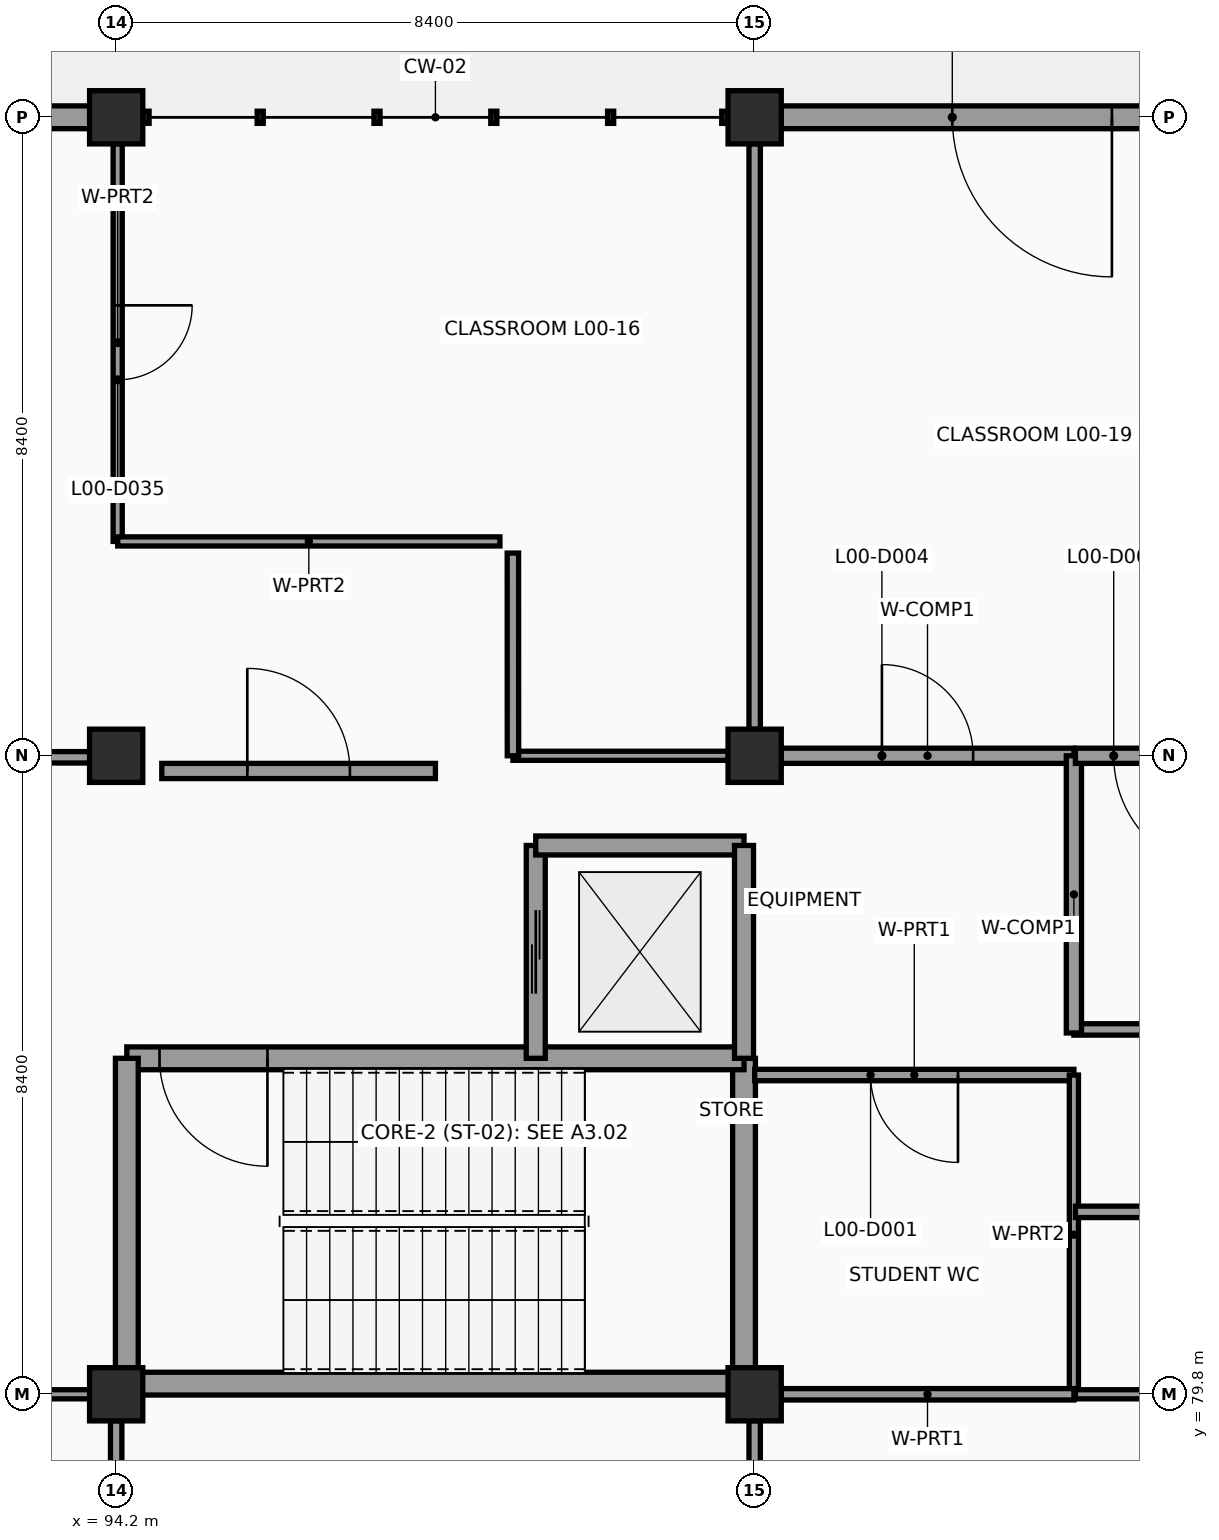
"""IFC4 building model, lengths in metres.
Left out: names, types, materials, properties, quantities, classifications, styles, units other than length and angle.
Written with IfcOpenShell. Run it as: python <this file> out.ifc"""

import sys

from ifc_helpers import new_model, si_unit, direction, frame, frame_2d, origin, origin_2d, place, context, subcontext, project, spatial, rectangle, extrude, element, fill, save


model = new_model("IFC4")
c1 = context("Model", 3, precision=1e-05, world=origin(), true_north=direction((0.0, 1.0)))
c2 = subcontext(c1, "Body", "Model", "MODEL_VIEW")
j1 = project(units=[si_unit("LENGTHUNIT", "METRE"), si_unit("PLANEANGLEUNIT", "RADIAN")], contexts=[c1])
p1 = place(None, origin())
s1 = spatial("IfcSite", under=j1, at=p1, CompositionType="ELEMENT")
p2 = place(p1, origin())
s2 = spatial("IfcBuilding", under=s1, at=p2, CompositionType="ELEMENT")
p3 = place(p2, origin())
s3 = spatial("IfcBuildingStorey", under=s2, at=p3, CompositionType="ELEMENT", Elevation=0.0)
for number, where, z_axis, x_axis in (
    (1, (94.2, 79.8, -0.4), (0.0, 0.0, 1.0), (1.0, 0.0, 0.0)),
    (2, (94.2, 88.2, -0.4), (0.0, 0.0, 1.0), (1.0, 0.0, 0.0)),
    (3, (94.2, 96.6, -0.4), (0.0, 0.0, 1.0), (1.0, 0.0, 0.0)),
    (4, (102.6, 79.8, -0.4), (0.0, 0.0, 1.0), (1.0, 0.0, 0.0)),
    (5, (102.6, 88.2, -0.4), (0.0, 0.0, 1.0), (1.0, 0.0, 0.0)),
    (6, (102.6, 96.6, -0.4), (0.0, 0.0, 1.0), (1.0, 0.0, 0.0)),
):
    element("IfcColumn", number, at=place(p3, frame(where, z_axis=z_axis, x_axis=x_axis)), inside=s3, PredefinedType="COLUMN", context=c2, shape_type="SweptSolid", body=[
        extrude(rectangle(XDim=0.7, YDim=0.7, at=origin_2d()), origin(), (0.0, 0.0, 1.0), 4.6),
    ])
p4 = place(p3, frame((86.148, 96.6, 0.0), z_axis=(0.0, 0.0, 1.0), x_axis=(1.0, 0.0, 0.0)))
e7 = element("IfcWall", 7, at=p4, inside=s3, PredefinedType="SOLIDWALL", context=c2, shape_type="SweptSolid", body=[
    extrude(rectangle(XDim=7.704, YDim=0.3, at=frame_2d((3.852, 0.0))), origin(), (0.0, 0.0, 1.0), 3.22),
])
p5 = place(p4, frame((2.352, 0.0, 0.0)))
e8 = element("IfcOpeningElement", 8, at=p5, cuts=e7, PredefinedType="OPENING", context=c2, shape_type="SweptSolid", body=[
    extrude(rectangle(XDim=3.0, YDim=2.5, at=frame_2d((1.5, 1.25))), frame((0.0, 0.16, 0.0), z_axis=(0.0, -1.0, 0.0), x_axis=(1.0, 0.0, 0.0)), (0.0, 0.0, 1.0), 0.32),
])
p6 = place(p3, frame((102.948, 96.6, 0.0), z_axis=(0.0, 0.0, 1.0), x_axis=(1.0, 0.0, 0.0)))
e9 = element("IfcWall", 9, at=p6, inside=s3, PredefinedType="SOLIDWALL", context=c2, shape_type="SweptSolid", body=[
    extrude(rectangle(XDim=6.604, YDim=0.3, at=frame_2d((3.302, 0.0))), origin(), (0.0, 0.0, 1.0), 3.22),
])
p7 = place(p6, frame((2.252, 0.0, 0.0)))
e10 = element("IfcOpeningElement", 10, at=p7, cuts=e9, PredefinedType="OPENING", context=c2, shape_type="SweptSolid", body=[
    extrude(rectangle(XDim=2.1, YDim=2.3, at=frame_2d((1.05, 1.15))), frame((0.0, 0.16, 0.0), z_axis=(0.0, -1.0, 0.0), x_axis=(1.0, 0.0, 0.0)), (0.0, 0.0, 1.0), 0.32),
])
p8 = place(p3, frame((94.34, 79.94, -0.4), z_axis=(0.0, 0.0, 1.0), x_axis=(1.0, 0.0, 0.0)))
e11 = element("IfcWall", 11, at=p8, inside=s3, PredefinedType="SHEAR", context=c2, shape_type="SweptSolid", body=[
    extrude(rectangle(XDim=8.12, YDim=0.3, at=frame_2d((4.06, 0.0))), origin(), (0.0, 0.0, 1.0), 4.6),
])
p9 = place(p3, frame((102.46, 79.94, -0.4), z_axis=(0.0, 0.0, 1.0), x_axis=(0.0, 1.0, 0.0)))
e12 = element("IfcWall", 12, at=p9, inside=s3, PredefinedType="SHEAR", context=c2, shape_type="SweptSolid", body=[
    extrude(rectangle(XDim=4.28, YDim=0.3, at=frame_2d((2.14, 0.0))), origin(), (0.0, 0.0, 1.0), 4.6),
])
p10 = place(p3, frame((102.46, 84.22, -0.4), z_axis=(0.0, 0.0, 1.0), x_axis=(-1.0, 0.0, 0.0)))
e13 = element("IfcWall", 13, at=p10, inside=s3, PredefinedType="SHEAR", context=c2, shape_type="SweptSolid", body=[
    extrude(rectangle(XDim=8.12, YDim=0.3, at=frame_2d((4.06, 0.0))), origin(), (0.0, 0.0, 1.0), 4.6),
])
p11 = place(p10, frame((6.27, 0.0, 0.4)))
e14 = element("IfcOpeningElement", 14, at=p11, cuts=e13, PredefinedType="OPENING", context=c2, shape_type="SweptSolid", body=[
    extrude(rectangle(XDim=1.42, YDim=2.15, at=frame_2d((0.71, 1.075))), frame((0.0, 0.16, 0.0), z_axis=(0.0, -1.0, 0.0), x_axis=(1.0, 0.0, 0.0)), (0.0, 0.0, 1.0), 0.32),
])
p12 = place(p3, frame((94.34, 84.22, -0.4), z_axis=(0.0, 0.0, 1.0), x_axis=(0.0, -1.0, 0.0)))
e15 = element("IfcWall", 15, at=p12, inside=s3, PredefinedType="SHEAR", context=c2, shape_type="SweptSolid", body=[
    extrude(rectangle(XDim=4.28, YDim=0.3, at=frame_2d((2.14, 0.0))), origin(), (0.0, 0.0, 1.0), 4.6),
])
p13 = place(p3, frame((99.72, 87.02, -0.4), z_axis=(0.0, 0.0, 1.0), x_axis=(0.0, -1.0, 0.0)))
e16 = element("IfcWall", 16, at=p13, inside=s3, PredefinedType="SHEAR", context=c2, shape_type="SweptSolid", body=[
    extrude(rectangle(XDim=2.8, YDim=0.25, at=frame_2d((1.4, 0.0))), origin(), (0.0, 0.0, 1.0), 4.6),
])
p14 = place(p13, frame((0.85, 0.0, 0.4)))
e17 = element("IfcOpeningElement", 17, at=p14, cuts=e16, PredefinedType="OPENING", context=c2, shape_type="SweptSolid", body=[
    extrude(rectangle(XDim=1.1, YDim=2.15, at=frame_2d((0.55, 1.075))), frame((0.0, 0.135, 0.0), z_axis=(0.0, -1.0, 0.0), x_axis=(1.0, 0.0, 0.0)), (0.0, 0.0, 1.0), 0.27),
])
p15 = place(p3, frame((102.46, 87.02, -0.4), z_axis=(0.0, 0.0, 1.0), x_axis=(-1.0, 0.0, 0.0)))
e18 = element("IfcWall", 18, at=p15, inside=s3, PredefinedType="SHEAR", context=c2, shape_type="SweptSolid", body=[
    extrude(rectangle(XDim=2.74, YDim=0.25, at=frame_2d((1.37, 0.0))), origin(), (0.0, 0.0, 1.0), 4.6),
])
p16 = place(p3, frame((102.46, 84.22, -0.4), z_axis=(0.0, 0.0, 1.0), x_axis=(0.0, 1.0, 0.0)))
e19 = element("IfcWall", 19, at=p16, inside=s3, PredefinedType="SHEAR", context=c2, shape_type="SweptSolid", body=[
    extrude(rectangle(XDim=2.8, YDim=0.25, at=frame_2d((1.4, 0.0))), origin(), (0.0, 0.0, 1.0), 4.6),
])
p17 = place(p3, frame((98.4, 88.0, 0.0), z_axis=(0.0, 0.0, 1.0), x_axis=(-1.0, 0.0, 0.0)))
e20 = element("IfcWall", 20, at=p17, inside=s3, PredefinedType="PARTITIONING", context=c2, shape_type="SweptSolid", body=[
    extrude(rectangle(XDim=3.6, YDim=0.2, at=frame_2d((1.8, 0.0))), origin(), (0.0, 0.0, 1.0), 3.92),
])
p18 = place(p17, frame((1.125, 0.0, 0.0)))
e21 = element("IfcOpeningElement", 21, at=p18, cuts=e20, PredefinedType="OPENING", context=c2, shape_type="SweptSolid", body=[
    extrude(rectangle(XDim=1.35, YDim=2.15, at=frame_2d((0.675, 1.075))), frame((0.0, 0.11, 0.0), z_axis=(0.0, -1.0, 0.0), x_axis=(1.0, 0.0, 0.0)), (0.0, 0.0, 1.0), 0.22),
])
p19 = place(p3, frame((102.6, 84.0, 0.0), z_axis=(0.0, 0.0, 1.0), x_axis=(1.0, 0.0, 0.0)))
e22 = element("IfcWall", 22, at=p19, inside=s3, PredefinedType="PARTITIONING", context=c2, shape_type="SweptSolid", body=[
    extrude(rectangle(XDim=4.2, YDim=0.15, at=frame_2d((2.1, 0.0))), origin(), (0.0, 0.0, 1.0), 3.56),
])
p20 = place(p19, frame((1.525, 0.0, 0.0)))
e23 = element("IfcOpeningElement", 23, at=p20, cuts=e22, PredefinedType="OPENING", context=c2, shape_type="SweptSolid", body=[
    extrude(rectangle(XDim=1.15, YDim=2.15, at=frame_2d((0.575, 1.075))), frame((0.0, 0.085, 0.0), z_axis=(0.0, -1.0, 0.0), x_axis=(1.0, 0.0, 0.0)), (0.0, 0.0, 1.0), 0.17),
])
p21 = place(p3, frame((106.8, 84.0, 0.0), z_axis=(0.0, 0.0, 1.0), x_axis=(0.0, -1.0, 0.0)))
e24 = element("IfcWall", 24, at=p21, inside=s3, PredefinedType="PARTITIONING", context=c2, shape_type="SweptSolid", body=[
    extrude(rectangle(XDim=4.2, YDim=0.12, at=frame_2d((2.1, 0.0))), origin(), (0.0, 0.0, 1.0), 3.12),
])
p22 = place(p3, frame((106.8, 79.8, 0.0), z_axis=(0.0, 0.0, 1.0), x_axis=(-1.0, 0.0, 0.0)))
e25 = element("IfcWall", 25, at=p22, inside=s3, PredefinedType="PARTITIONING", context=c2, shape_type="SweptSolid", body=[
    extrude(rectangle(XDim=3.852, YDim=0.15, at=frame_2d((1.926, 0.0))), origin(), (0.0, 0.0, 1.0), 3.12),
])
p23 = place(p3, frame((110.677, 79.8, 0.0), z_axis=(0.0, 0.0, 1.0), x_axis=(-1.0, 0.0, 0.0)))
e26 = element("IfcWall", 26, at=p23, inside=s3, PredefinedType="PARTITIONING", context=c2, shape_type="SweptSolid", body=[
    extrude(rectangle(XDim=3.857, YDim=0.12, at=frame_2d((1.928, 0.0))), origin(), (0.0, 0.0, 1.0), 3.12),
])
p24 = place(p3, frame((106.82, 82.2, 0.0), z_axis=(0.0, 0.0, 1.0), x_axis=(1.0, 0.0, 0.0)))
e27 = element("IfcWall", 27, at=p24, inside=s3, PredefinedType="PARTITIONING", context=c2, shape_type="SweptSolid", body=[
    extrude(rectangle(XDim=4.18, YDim=0.15, at=frame_2d((2.09, 0.0))), origin(), (0.0, 0.0, 1.0), 3.27),
])
p25 = place(p24, frame((1.465, 0.0, 0.0)))
e28 = element("IfcOpeningElement", 28, at=p25, cuts=e27, PredefinedType="OPENING", context=c2, shape_type="SweptSolid", body=[
    extrude(rectangle(XDim=1.25, YDim=2.15, at=frame_2d((0.625, 1.075))), frame((0.0, 0.085, 0.0), z_axis=(0.0, -1.0, 0.0), x_axis=(1.0, 0.0, 0.0)), (0.0, 0.0, 1.0), 0.17),
])
p26 = place(p3, frame((106.8, 84.6, 0.0), z_axis=(0.0, 0.0, 1.0), x_axis=(1.0, 0.0, 0.0)))
e29 = element("IfcWall", 29, at=p26, inside=s3, PredefinedType="PARTITIONING", context=c2, shape_type="SweptSolid", body=[
    extrude(rectangle(XDim=4.2, YDim=0.15, at=frame_2d((2.1, 0.0))), origin(), (0.0, 0.0, 1.0), 3.27),
])
p27 = place(p26, frame((1.575, 0.0, 0.0)))
e30 = element("IfcOpeningElement", 30, at=p27, cuts=e29, PredefinedType="OPENING", context=c2, shape_type="SweptSolid", body=[
    extrude(rectangle(XDim=1.05, YDim=2.15, at=frame_2d((0.525, 1.075))), frame((0.0, 0.085, 0.0), z_axis=(0.0, -1.0, 0.0), x_axis=(1.0, 0.0, 0.0)), (0.0, 0.0, 1.0), 0.17),
])
p28 = place(p3, frame((102.948, 88.2, 0.0), z_axis=(0.0, 0.0, 1.0), x_axis=(1.0, 0.0, 0.0)))
e31 = element("IfcWall", 31, at=p28, inside=s3, PredefinedType="PARTITIONING", context=c2, shape_type="SweptSolid", body=[
    extrude(rectangle(XDim=3.852, YDim=0.2, at=frame_2d((1.926, 0.0))), origin(), (0.0, 0.0, 1.0), 3.47),
])
p29 = place(p28, frame((1.326, 0.0, 0.0)))
e32 = element("IfcOpeningElement", 32, at=p29, cuts=e31, PredefinedType="OPENING", context=c2, shape_type="SweptSolid", body=[
    extrude(rectangle(XDim=1.2, YDim=2.15, at=frame_2d((0.6, 1.075))), frame((0.0, 0.11, 0.0), z_axis=(0.0, -1.0, 0.0), x_axis=(1.0, 0.0, 0.0)), (0.0, 0.0, 1.0), 0.22),
])
p30 = place(p3, frame((106.8, 88.2, 0.0), z_axis=(0.0, 0.0, 1.0), x_axis=(0.0, -1.0, 0.0)))
e33 = element("IfcWall", 33, at=p30, inside=s3, PredefinedType="PARTITIONING", context=c2, shape_type="SweptSolid", body=[
    extrude(rectangle(XDim=3.646, YDim=0.2, at=frame_2d((1.823, 0.0))), origin(), (0.0, 0.0, 1.0), 3.47),
])
p31 = place(p3, frame((106.82, 88.2, 0.0), z_axis=(0.0, 0.0, 1.0), x_axis=(1.0, 0.0, 0.0)))
e34 = element("IfcWall", 34, at=p31, inside=s3, PredefinedType="PARTITIONING", context=c2, shape_type="SweptSolid", body=[
    extrude(rectangle(XDim=3.857, YDim=0.2, at=frame_2d((1.928, 0.0))), origin(), (0.0, 0.0, 1.0), 3.47),
])
p32 = place(p31, frame((0.503, 0.0, 0.0)))
e35 = element("IfcOpeningElement", 35, at=p32, cuts=e34, PredefinedType="OPENING", context=c2, shape_type="SweptSolid", body=[
    extrude(rectangle(XDim=1.55, YDim=2.2, at=frame_2d((0.775, 1.1))), frame((0.0, 0.11, 0.0), z_axis=(0.0, -1.0, 0.0), x_axis=(1.0, 0.0, 0.0)), (0.0, 0.0, 1.0), 0.22),
])
p33 = place(p3, frame((86.148, 79.8, 0.0), z_axis=(0.0, 0.0, 1.0), x_axis=(1.0, 0.0, 0.0)))
e36 = element("IfcWall", 36, at=p33, inside=s3, PredefinedType="PARTITIONING", context=c2, shape_type="SweptSolid", body=[
    extrude(rectangle(XDim=7.704, YDim=0.12, at=frame_2d((3.852, 0.0))), origin(), (0.0, 0.0, 1.0), 3.12),
])
p34 = place(p3, frame((94.2, 79.452, 0.0), z_axis=(0.0, 0.0, 1.0), x_axis=(0.0, -1.0, 0.0)))
e37 = element("IfcWall", 37, at=p34, inside=s3, PredefinedType="PARTITIONING", context=c2, shape_type="SweptSolid", body=[
    extrude(rectangle(XDim=5.652, YDim=0.15, at=frame_2d((2.826, 0.0))), origin(), (0.0, 0.0, 1.0), 3.52),
])
p35 = place(p3, frame((86.148, 88.18, 0.0), z_axis=(0.0, 0.0, 1.0), x_axis=(1.0, 0.0, 0.0)))
e38 = element("IfcWall", 38, at=p35, inside=s3, PredefinedType="PARTITIONING", context=c2, shape_type="SweptSolid", body=[
    extrude(rectangle(XDim=7.704, YDim=0.15, at=frame_2d((3.852, 0.0))), origin(), (0.0, 0.0, 1.0), 3.47),
])
p36 = place(p35, frame((3.277, 0.0, 0.0)))
e39 = element("IfcOpeningElement", 39, at=p36, cuts=e38, PredefinedType="OPENING", context=c2, shape_type="SweptSolid", body=[
    extrude(rectangle(XDim=1.15, YDim=2.15, at=frame_2d((0.575, 1.075))), frame((0.0, 0.085, 0.0), z_axis=(0.0, -1.0, 0.0), x_axis=(1.0, 0.0, 0.0)), (0.0, 0.0, 1.0), 0.17),
])
p37 = place(p3, frame((102.6, 79.452, 0.0), z_axis=(0.0, 0.0, 1.0), x_axis=(0.0, -1.0, 0.0)))
e40 = element("IfcWall", 40, at=p37, inside=s3, PredefinedType="PARTITIONING", context=c2, shape_type="SweptSolid", body=[
    extrude(rectangle(XDim=5.652, YDim=0.15, at=frame_2d((2.826, 0.0))), origin(), (0.0, 0.0, 1.0), 3.56),
])
p38 = place(p37, frame((2.226, 0.0, 0.0)))
e41 = element("IfcOpeningElement", 41, at=p38, cuts=e40, PredefinedType="OPENING", context=c2, shape_type="SweptSolid", body=[
    extrude(rectangle(XDim=1.2, YDim=2.15, at=frame_2d((0.6, 1.075))), frame((0.0, 0.085, 0.0), z_axis=(0.0, -1.0, 0.0), x_axis=(1.0, 0.0, 0.0)), (0.0, 0.0, 1.0), 0.17),
])
p39 = place(p3, frame((94.22, 91.02, 0.0), z_axis=(0.0, 0.0, 1.0), x_axis=(0.0, 1.0, 0.0)))
e42 = element("IfcWall", 42, at=p39, inside=s3, PredefinedType="PARTITIONING", context=c2, shape_type="SweptSolid", body=[
    extrude(rectangle(XDim=5.232, YDim=0.12, at=frame_2d((2.616, 0.0))), origin(), (0.0, 0.0, 1.0), 3.52),
])
p40 = place(p39, frame((2.126, 0.0, 0.0)))
e43 = element("IfcOpeningElement", 43, at=p40, cuts=e42, PredefinedType="OPENING", context=c2, shape_type="SweptSolid", body=[
    extrude(rectangle(XDim=0.98, YDim=2.12, at=frame_2d((0.49, 1.06))), frame((0.0, 0.07, 0.0), z_axis=(0.0, -1.0, 0.0), x_axis=(1.0, 0.0, 0.0)), (0.0, 0.0, 1.0), 0.14),
])
p41 = place(p3, frame((102.6, 96.252, 0.0), z_axis=(0.0, 0.0, 1.0), x_axis=(0.0, -1.0, 0.0)))
e44 = element("IfcWall", 44, at=p41, inside=s3, PredefinedType="PARTITIONING", context=c2, shape_type="SweptSolid", body=[
    extrude(rectangle(XDim=7.704, YDim=0.15, at=frame_2d((3.852, 0.0))), origin(), (0.0, 0.0, 1.0), 3.56),
])
p42 = place(p3, frame((102.252, 88.2, 0.0), z_axis=(0.0, 0.0, 1.0), x_axis=(-1.0, 0.0, 0.0)))
e45 = element("IfcWall", 45, at=p42, inside=s3, PredefinedType="PARTITIONING", context=c2, shape_type="SweptSolid", body=[
    extrude(rectangle(XDim=2.832, YDim=0.12, at=frame_2d((1.416, 0.0))), origin(), (0.0, 0.0, 1.0), 3.47),
])
p43 = place(p3, frame((99.42, 88.2, 0.0), z_axis=(0.0, 0.0, 1.0), x_axis=(-0.000274624669, 0.999999962291, 0.0)))
e46 = element("IfcWall", 46, at=p43, inside=s3, PredefinedType="PARTITIONING", context=c2, shape_type="SweptSolid", body=[
    extrude(rectangle(XDim=2.667, YDim=0.15, at=frame_2d((1.333, 0.0))), origin(), (0.0, 0.0, 1.0), 3.47),
])
p44 = place(p3, frame((99.249, 91.02, 0.0), z_axis=(0.0, 0.0, 1.0), x_axis=(-1.0, 0.0, 0.0)))
e47 = element("IfcWall", 47, at=p44, inside=s3, PredefinedType="PARTITIONING", context=c2, shape_type="SweptSolid", body=[
    extrude(rectangle(XDim=5.029, YDim=0.12, at=frame_2d((2.514, 0.0))), origin(), (0.0, 0.0, 1.0), 3.47),
])
p45 = place(p7, origin())
e48 = element("IfcDoor", 48, at=p45, inside=s3, OperationType="DOUBLE_DOOR_SINGLE_SWING", PredefinedType="DOOR", context=c2, shape_type="SweptSolid", body=[
    extrude(rectangle(XDim=2.1, YDim=2.3, at=frame_2d((1.05, 1.15))), frame((0.0, 0.025, 0.0), z_axis=(0.0, -1.0, 0.0), x_axis=(1.0, 0.0, 0.0)), (0.0, 0.0, 1.0), 0.05),
])
fill(e10, e48)
p46 = place(p11, origin())
e49 = element("IfcDoor", 49, at=p46, inside=s3, OperationType="SINGLE_SWING_LEFT", PredefinedType="DOOR", context=c2, shape_type="SweptSolid", body=[
    extrude(rectangle(XDim=1.42, YDim=2.15, at=frame_2d((0.71, 1.075))), frame((0.0, 0.025, 0.0), z_axis=(0.0, -1.0, 0.0), x_axis=(1.0, 0.0, 0.0)), (0.0, 0.0, 1.0), 0.05),
])
fill(e14, e49)
p47 = place(p14, origin())
e50 = element("IfcDoor", 50, at=p47, inside=s3, OperationType="DOUBLE_DOOR_SLIDING", PredefinedType="DOOR", context=c2, shape_type="SweptSolid", body=[
    extrude(rectangle(XDim=1.1, YDim=2.15, at=frame_2d((0.55, 1.075))), frame((0.0, 0.025, 0.0), z_axis=(0.0, -1.0, 0.0), x_axis=(1.0, 0.0, 0.0)), (0.0, 0.0, 1.0), 0.05),
])
fill(e17, e50)
p48 = place(p18, origin())
e51 = element("IfcDoor", 51, at=p48, inside=s3, OperationType="SINGLE_SWING_RIGHT", PredefinedType="DOOR", context=c2, shape_type="SweptSolid", body=[
    extrude(rectangle(XDim=1.35, YDim=2.15, at=frame_2d((0.675, 1.075))), frame((0.0, 0.025, 0.0), z_axis=(0.0, -1.0, 0.0), x_axis=(1.0, 0.0, 0.0)), (0.0, 0.0, 1.0), 0.05),
])
fill(e21, e51)
p49 = place(p20, origin())
e52 = element("IfcDoor", 52, at=p49, inside=s3, OperationType="SINGLE_SWING_RIGHT", PredefinedType="DOOR", context=c2, shape_type="SweptSolid", body=[
    extrude(rectangle(XDim=1.15, YDim=2.15, at=frame_2d((0.575, 1.075))), frame((0.0, 0.025, 0.0), z_axis=(0.0, -1.0, 0.0), x_axis=(1.0, 0.0, 0.0)), (0.0, 0.0, 1.0), 0.05),
])
fill(e23, e52)
p50 = place(p29, origin())
e53 = element("IfcDoor", 53, at=p50, inside=s3, OperationType="SINGLE_SWING_LEFT", PredefinedType="DOOR", context=c2, shape_type="SweptSolid", body=[
    extrude(rectangle(XDim=1.2, YDim=2.15, at=frame_2d((0.6, 1.075))), frame((0.0, 0.025, 0.0), z_axis=(0.0, -1.0, 0.0), x_axis=(1.0, 0.0, 0.0)), (0.0, 0.0, 1.0), 0.05),
])
fill(e32, e53)
p51 = place(p32, origin())
e54 = element("IfcDoor", 54, at=p51, inside=s3, OperationType="DOUBLE_DOOR_SINGLE_SWING", PredefinedType="DOOR", context=c2, shape_type="SweptSolid", body=[
    extrude(rectangle(XDim=1.55, YDim=2.2, at=frame_2d((0.775, 1.1))), frame((0.0, 0.025, 0.0), z_axis=(0.0, -1.0, 0.0), x_axis=(1.0, 0.0, 0.0)), (0.0, 0.0, 1.0), 0.05),
])
fill(e35, e54)
p52 = place(p40, origin())
e55 = element("IfcDoor", 55, at=p52, inside=s3, OperationType="SINGLE_SWING_RIGHT", PredefinedType="DOOR", context=c2, shape_type="SweptSolid", body=[
    extrude(rectangle(XDim=0.98, YDim=2.12, at=frame_2d((0.49, 1.06))), frame((0.0, 0.025, 0.0), z_axis=(0.0, -1.0, 0.0), x_axis=(1.0, 0.0, 0.0)), (0.0, 0.0, 1.0), 0.05),
])
fill(e43, e55)
save(model, sys.argv[1])
